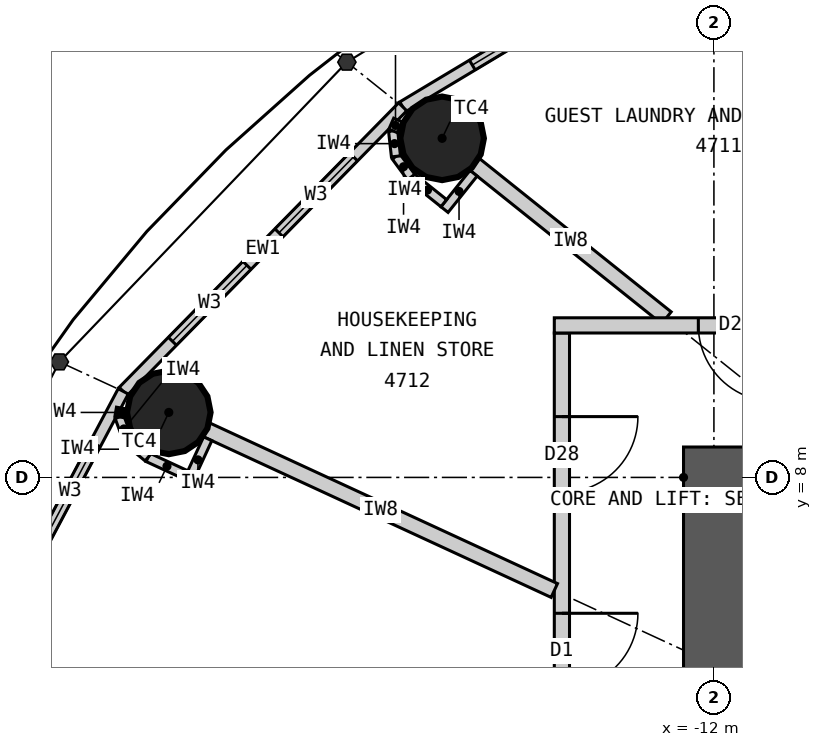
"""IFC4 building model, lengths in metres.
Left out: names, types, materials, properties, quantities, classifications, styles, units other than length and angle.
Written with IfcOpenShell. Run it as: python <this file> out.ifc"""

import sys

from ifc_helpers import new_model, si_unit, direction, frame, frame_2d, origin, origin_2d, place, context, subcontext, project, spatial, rectangle, circle, extrude, element, fill, save


model = new_model("IFC4")
c1 = context("Model", 3, precision=1e-05, world=origin(), true_north=direction((0.0, 1.0)))
c2 = subcontext(c1, "Body", "Model", "MODEL_VIEW")
j1 = project(units=[si_unit("LENGTHUNIT", "METRE"), si_unit("PLANEANGLEUNIT", "RADIAN")], contexts=[c1])
p1 = place(None, origin())
s1 = spatial("IfcSite", under=j1, at=p1, CompositionType="ELEMENT")
p2 = place(p1, origin())
s2 = spatial("IfcBuilding", under=s1, at=p2, CompositionType="ELEMENT")
p3 = place(p2, frame((0.0, 0.0, 176.4)))
s3 = spatial("IfcBuildingStorey", under=s2, at=p3, CompositionType="ELEMENT", Elevation=176.4)
for number, where, z_axis, x_axis in (
    (1, (-15.576, 12.461, 0.0), (0.0, 0.0, 1.0), (1.0, 0.0, 0.0)),
    (2, (-19.172, 8.855, 0.0), (0.0, 0.0, 1.0), (1.0, 0.0, 0.0)),
):
    element("IfcColumn", number, at=place(p3, frame(where, z_axis=z_axis, x_axis=x_axis)), inside=s3, PredefinedType="COLUMN", context=c2, shape_type="SweptSolid", body=[
        extrude(circle(Radius=0.55, at=origin_2d()), origin(), (0.0, 0.0, 1.0), 3.3),
    ])
p4 = place(p3, frame((-12.4, 8.0, 0.0), z_axis=(0.0, 0.0, 1.0), x_axis=(1.0, 0.0, 0.0)))
e3 = element("IfcWall", 3, at=p4, inside=s3, PredefinedType="SHEAR", context=c2, shape_type="SweptSolid", body=[
    extrude(rectangle(XDim=24.8, YDim=0.8, at=frame_2d((12.4, 0.0))), origin(), (0.0, 0.0, 1.0), 3.3),
])
p5 = place(p4, frame((11.1, 0.0, 0.0)))
e4 = element("IfcOpeningElement", 4, at=p5, cuts=e3, PredefinedType="OPENING", context=c2, shape_type="SweptSolid", body=[
    extrude(rectangle(XDim=1.2, YDim=2.2, at=frame_2d((0.6, 1.1))), frame((0.0, 0.41, 0.0), z_axis=(0.0, -1.0, 0.0), x_axis=(1.0, 0.0, 0.0)), (0.0, 0.0, 1.0), 0.82),
])
p6 = place(p4, frame((18.7, 0.0, 0.0)))
e5 = element("IfcOpeningElement", 5, at=p6, cuts=e3, PredefinedType="OPENING", context=c2, shape_type="SweptSolid", body=[
    extrude(rectangle(XDim=0.9, YDim=2.2, at=frame_2d((0.45, 1.1))), frame((0.0, 0.41, 0.0), z_axis=(0.0, -1.0, 0.0), x_axis=(1.0, 0.0, 0.0)), (0.0, 0.0, 1.0), 0.82),
])
p7 = place(p3, frame((-12.0, 7.6, 0.0), z_axis=(0.0, 0.0, 1.0), x_axis=(0.0, -1.0, 0.0)))
e6 = element("IfcWall", 6, at=p7, inside=s3, PredefinedType="SHEAR", context=c2, shape_type="SweptSolid", body=[
    extrude(rectangle(XDim=15.2, YDim=0.8, at=frame_2d((7.6, 0.0))), origin(), (0.0, 0.0, 1.0), 3.3),
])
p8 = place(p7, frame((6.7, 0.0, 0.0)))
e7 = element("IfcOpeningElement", 7, at=p8, cuts=e6, PredefinedType="OPENING", context=c2, shape_type="SweptSolid", body=[
    extrude(rectangle(XDim=1.8, YDim=2.2, at=frame_2d((0.9, 1.1))), frame((0.0, 0.41, 0.0), z_axis=(0.0, -1.0, 0.0), x_axis=(1.0, 0.0, 0.0)), (0.0, 0.0, 1.0), 0.82),
])
p9 = place(p3, frame((-11.346, 15.722, 0.0), z_axis=(0.0, 0.0, 1.0), x_axis=(-0.857695199231, -0.514158482587, 0.0)))
e8 = element("IfcWall", 8, at=p9, inside=s3, PredefinedType="ELEMENTEDWALL", context=c2, shape_type="SweptSolid", body=[
    extrude(rectangle(XDim=5.536, YDim=0.15, at=frame_2d((2.768, 0.0))), origin(), (0.0, 0.0, 1.0), 3.12),
])
p10 = place(p9, frame((1.068, 0.0, 0.9)))
e9 = element("IfcOpeningElement", 9, at=p10, cuts=e8, PredefinedType="OPENING", context=c2, shape_type="SweptSolid", body=[
    extrude(rectangle(XDim=1.4, YDim=1.9, at=frame_2d((0.7, 0.95))), frame((0.0, 0.085, 0.0), z_axis=(0.0, -1.0, 0.0), x_axis=(1.0, 0.0, 0.0)), (0.0, 0.0, 1.0), 0.17),
])
p11 = place(p9, frame((3.068, 0.0, 0.9)))
e10 = element("IfcOpeningElement", 10, at=p11, cuts=e8, PredefinedType="OPENING", context=c2, shape_type="SweptSolid", body=[
    extrude(rectangle(XDim=1.4, YDim=1.9, at=frame_2d((0.7, 0.95))), frame((0.0, 0.085, 0.0), z_axis=(0.0, -1.0, 0.0), x_axis=(1.0, 0.0, 0.0)), (0.0, 0.0, 1.0), 0.17),
])
p12 = place(p3, frame((-16.095, 12.876, 0.0), z_axis=(0.0, 0.0, 1.0), x_axis=(-0.700727467776, -0.71342905457, 0.0)))
e11 = element("IfcWall", 11, at=p12, inside=s3, PredefinedType="ELEMENTEDWALL", context=c2, shape_type="SweptSolid", body=[
    extrude(rectangle(XDim=5.247, YDim=0.15, at=frame_2d((2.624, 0.0))), origin(), (0.0, 0.0, 1.0), 3.12),
])
p13 = place(p12, frame((0.924, 0.0, 0.9)))
e12 = element("IfcOpeningElement", 12, at=p13, cuts=e11, PredefinedType="OPENING", context=c2, shape_type="SweptSolid", body=[
    extrude(rectangle(XDim=1.4, YDim=1.9, at=frame_2d((0.7, 0.95))), frame((0.0, 0.085, 0.0), z_axis=(0.0, -1.0, 0.0), x_axis=(1.0, 0.0, 0.0)), (0.0, 0.0, 1.0), 0.17),
])
p14 = place(p12, frame((2.924, 0.0, 0.9)))
e13 = element("IfcOpeningElement", 13, at=p14, cuts=e11, PredefinedType="OPENING", context=c2, shape_type="SweptSolid", body=[
    extrude(rectangle(XDim=1.4, YDim=1.9, at=frame_2d((0.7, 0.95))), frame((0.0, 0.085, 0.0), z_axis=(0.0, -1.0, 0.0), x_axis=(1.0, 0.0, 0.0)), (0.0, 0.0, 1.0), 0.17),
])
p15 = place(p3, frame((-19.772, 9.132, 0.0), z_axis=(0.0, 0.0, 1.0), x_axis=(-0.468428906714, -0.883501193748, 0.0)))
e14 = element("IfcWall", 14, at=p15, inside=s3, PredefinedType="ELEMENTEDWALL", context=c2, shape_type="SweptSolid", body=[
    extrude(rectangle(XDim=4.974, YDim=0.15, at=frame_2d((2.487, 0.0))), origin(), (0.0, 0.0, 1.0), 3.12),
])
p16 = place(p15, frame((0.787, 0.0, 0.9)))
e15 = element("IfcOpeningElement", 15, at=p16, cuts=e14, PredefinedType="OPENING", context=c2, shape_type="SweptSolid", body=[
    extrude(rectangle(XDim=1.4, YDim=1.9, at=frame_2d((0.7, 0.95))), frame((0.0, 0.085, 0.0), z_axis=(0.0, -1.0, 0.0), x_axis=(1.0, 0.0, 0.0)), (0.0, 0.0, 1.0), 0.17),
])
p17 = place(p15, frame((2.787, 0.0, 0.9)))
e16 = element("IfcOpeningElement", 16, at=p17, cuts=e14, PredefinedType="OPENING", context=c2, shape_type="SweptSolid", body=[
    extrude(rectangle(XDim=1.4, YDim=1.9, at=frame_2d((0.7, 0.95))), frame((0.0, 0.085, 0.0), z_axis=(0.0, -1.0, 0.0), x_axis=(1.0, 0.0, 0.0)), (0.0, 0.0, 1.0), 0.17),
])
p18 = place(p3, frame((-14.0, 9.9, 0.0), z_axis=(0.0, 0.0, 1.0), x_axis=(0.0, -1.0, 0.0)))
e17 = element("IfcWall", 17, at=p18, inside=s3, PredefinedType="PARTITIONING", context=c2, shape_type="SweptSolid", body=[
    extrude(rectangle(XDim=19.8, YDim=0.2, at=frame_2d((9.9, 0.0))), origin(), (0.0, 0.0, 1.0), 3.12),
])
p19 = place(p18, frame((13.853, 0.0, 0.0)))
e18 = element("IfcOpeningElement", 18, at=p19, cuts=e17, PredefinedType="OPENING", context=c2, shape_type="SweptSolid", body=[
    extrude(rectangle(XDim=1.0, YDim=2.2, at=frame_2d((0.5, 1.1))), frame((0.0, 0.11, 0.0), z_axis=(0.0, -1.0, 0.0), x_axis=(1.0, 0.0, 0.0)), (0.0, 0.0, 1.0), 0.22),
])
p20 = place(p18, frame((1.1, 0.0, 0.0)))
e19 = element("IfcOpeningElement", 19, at=p20, cuts=e17, PredefinedType="OPENING", context=c2, shape_type="SweptSolid", body=[
    extrude(rectangle(XDim=1.0, YDim=2.2, at=frame_2d((0.5, 1.1))), frame((0.0, 0.11, 0.0), z_axis=(0.0, -1.0, 0.0), x_axis=(1.0, 0.0, 0.0)), (0.0, 0.0, 1.0), 0.22),
])
p21 = place(p18, frame((3.688, 0.0, 0.0)))
e20 = element("IfcOpeningElement", 20, at=p21, cuts=e17, PredefinedType="OPENING", context=c2, shape_type="SweptSolid", body=[
    extrude(rectangle(XDim=1.0, YDim=2.2, at=frame_2d((0.5, 1.1))), frame((0.0, 0.11, 0.0), z_axis=(0.0, -1.0, 0.0), x_axis=(1.0, 0.0, 0.0)), (0.0, 0.0, 1.0), 0.22),
])
p22 = place(p18, frame((8.719, 0.0, 0.0)))
e21 = element("IfcOpeningElement", 21, at=p22, cuts=e17, PredefinedType="OPENING", context=c2, shape_type="SweptSolid", body=[
    extrude(rectangle(XDim=1.0, YDim=2.2, at=frame_2d((0.5, 1.1))), frame((0.0, 0.11, 0.0), z_axis=(0.0, -1.0, 0.0), x_axis=(1.0, 0.0, 0.0)), (0.0, 0.0, 1.0), 0.22),
])
p23 = place(p3, frame((-12.625, 10.1, 0.0), z_axis=(0.0, 0.0, 1.0), x_axis=(-0.780876185034, 0.624685827954, 0.0)))
e22 = element("IfcWall", 22, at=p23, inside=s3, PredefinedType="PARTITIONING", context=c2, shape_type="SweptSolid", body=[
    extrude(rectangle(XDim=3.229, YDim=0.2, at=frame_2d((1.615, 0.0))), origin(), (0.0, 0.0, 1.0), 2.42),
])
p24 = place(p3, frame((-14.1, 6.512, 0.0), z_axis=(0.0, 0.0, 1.0), x_axis=(-0.907823150669, 0.419353224751, 0.0)))
e23 = element("IfcWall", 23, at=p24, inside=s3, PredefinedType="PARTITIONING", context=c2, shape_type="SweptSolid", body=[
    extrude(rectangle(XDim=5.037, YDim=0.2, at=frame_2d((2.519, 0.0))), origin(), (0.0, 0.0, 1.0), 2.32),
])
p25 = place(p3, frame((-14.1, 10.0, 0.0), z_axis=(0.0, 0.0, 1.0), x_axis=(1.0, 0.0, 0.0)))
e24 = element("IfcWall", 24, at=p25, inside=s3, PredefinedType="PARTITIONING", context=c2, shape_type="SweptSolid", body=[
    extrude(rectangle(XDim=15.808, YDim=0.2, at=frame_2d((7.904, 0.0))), origin(), (0.0, 0.0, 1.0), 3.12),
])
p26 = place(p25, frame((11.135, 0.0, 0.0)))
e25 = element("IfcOpeningElement", 25, at=p26, cuts=e24, PredefinedType="OPENING", context=c2, shape_type="SweptSolid", body=[
    extrude(rectangle(XDim=1.0, YDim=2.2, at=frame_2d((0.5, 1.1))), frame((0.0, 0.11, 0.0), z_axis=(0.0, -1.0, 0.0), x_axis=(1.0, 0.0, 0.0)), (0.0, 0.0, 1.0), 0.22),
])
p27 = place(p25, frame((1.895, 0.0, 0.0)))
e26 = element("IfcOpeningElement", 26, at=p27, cuts=e24, PredefinedType="OPENING", context=c2, shape_type="SweptSolid", body=[
    extrude(rectangle(XDim=1.0, YDim=2.2, at=frame_2d((0.5, 1.1))), frame((0.0, 0.11, 0.0), z_axis=(0.0, -1.0, 0.0), x_axis=(1.0, 0.0, 0.0)), (0.0, 0.0, 1.0), 0.22),
])
p28 = place(p3, frame((-15.162, 12.002, 0.0), z_axis=(0.0, 0.0, 1.0), x_axis=(-0.624597762427, -0.780946627607, 0.0)))
e27 = element("IfcWall", 27, at=p28, inside=s3, PredefinedType="PARTITIONING", context=c2, shape_type="SweptSolid", body=[
    extrude(rectangle(XDim=0.612, YDim=0.12, at=frame_2d((0.306, 0.0))), origin(), (0.0, 0.0, 1.0), 3.12),
])
p29 = place(p3, frame((-15.554, 11.608, 0.0), z_axis=(0.0, 0.0, 1.0), x_axis=(-0.780695577787, 0.624911525597, 0.0)))
e28 = element("IfcWall", 28, at=p29, inside=s3, PredefinedType="PARTITIONING", context=c2, shape_type="SweptSolid", body=[
    extrude(rectangle(XDim=0.55, YDim=0.12, at=frame_2d((0.275, 0.0))), origin(), (0.0, 0.0, 1.0), 3.12),
])
p30 = place(p3, frame((-15.984, 11.952, 0.0), z_axis=(0.0, 0.0, 1.0), x_axis=(-0.592335221171, 0.805691619517, 0.0)))
e29 = element("IfcWall", 29, at=p30, inside=s3, PredefinedType="PARTITIONING", context=c2, shape_type="SweptSolid", body=[
    extrude(rectangle(XDim=0.338, YDim=0.12, at=frame_2d((0.169, 0.0))), origin(), (0.0, 0.0, 1.0), 3.12),
])
p31 = place(p3, frame((-16.184, 12.224, 0.0), z_axis=(0.0, 0.0, 1.0), x_axis=(-0.110669692975, 0.993857242795, 0.0)))
e30 = element("IfcWall", 30, at=p31, inside=s3, PredefinedType="PARTITIONING", context=c2, shape_type="SweptSolid", body=[
    extrude(rectangle(XDim=0.337, YDim=0.12, at=frame_2d((0.169, 0.0))), origin(), (0.0, 0.0, 1.0), 3.12),
])
p32 = place(p3, frame((-16.221, 12.559, 0.0), z_axis=(0.0, 0.0, 1.0), x_axis=(0.401064416249, 0.916049853457, 0.0)))
e31 = element("IfcWall", 31, at=p32, inside=s3, PredefinedType="PARTITIONING", context=c2, shape_type="SweptSolid", body=[
    extrude(rectangle(XDim=0.156, YDim=0.12, at=frame_2d((0.078, 0.0))), origin(), (0.0, 0.0, 1.0), 3.12),
])
p33 = place(p3, frame((-18.66, 8.509, 0.0), z_axis=(0.0, 0.0, 1.0), x_axis=(-0.419083463716, -0.907947713494, 0.0)))
e32 = element("IfcWall", 32, at=p33, inside=s3, PredefinedType="PARTITIONING", context=c2, shape_type="SweptSolid", body=[
    extrude(rectangle(XDim=0.612, YDim=0.12, at=frame_2d((0.306, 0.0))), origin(), (0.0, 0.0, 1.0), 3.12),
])
p34 = place(p3, frame((-18.946, 8.032, 0.0), z_axis=(0.0, 0.0, 1.0), x_axis=(-0.907842467956, 0.419311403822, 0.0)))
e33 = element("IfcWall", 33, at=p34, inside=s3, PredefinedType="PARTITIONING", context=c2, shape_type="SweptSolid", body=[
    extrude(rectangle(XDim=0.55, YDim=0.12, at=frame_2d((0.275, 0.0))), origin(), (0.0, 0.0, 1.0), 3.12),
])
p35 = place(p3, frame((-19.446, 8.263, 0.0), z_axis=(0.0, 0.0, 1.0), x_axis=(-0.768221279597, 0.640184399664, 0.0)))
e34 = element("IfcWall", 34, at=p35, inside=s3, PredefinedType="PARTITIONING", context=c2, shape_type="SweptSolid", body=[
    extrude(rectangle(XDim=0.337, YDim=0.12, at=frame_2d((0.169, 0.0))), origin(), (0.0, 0.0, 1.0), 3.12),
])
p36 = place(p3, frame((-19.705, 8.479, 0.0), z_axis=(0.0, 0.0, 1.0), x_axis=(-0.345571344575, 0.938392479621, 0.0)))
e35 = element("IfcWall", 35, at=p36, inside=s3, PredefinedType="PARTITIONING", context=c2, shape_type="SweptSolid", body=[
    extrude(rectangle(XDim=0.338, YDim=0.12, at=frame_2d((0.169, 0.0))), origin(), (0.0, 0.0, 1.0), 3.12),
])
p37 = place(p3, frame((-19.822, 8.796, 0.0), z_axis=(0.0, 0.0, 1.0), x_axis=(0.169701508781, 0.985495508827, 0.0)))
e36 = element("IfcWall", 36, at=p37, inside=s3, PredefinedType="PARTITIONING", context=c2, shape_type="SweptSolid", body=[
    extrude(rectangle(XDim=0.119, YDim=0.12, at=frame_2d((0.06, 0.0))), origin(), (0.0, 0.0, 1.0), 3.12),
])
p38 = place(p11, origin())
e37 = element("IfcWindow", 37, at=p38, inside=s3, PartitioningType="SINGLE_PANEL", PredefinedType="WINDOW", context=c2, shape_type="SweptSolid", body=[
    extrude(rectangle(XDim=1.4, YDim=1.9, at=frame_2d((0.7, 0.95))), frame((0.0, 0.03, 0.0), z_axis=(0.0, -1.0, 0.0), x_axis=(1.0, 0.0, 0.0)), (0.0, 0.0, 1.0), 0.06),
])
fill(e10, e37)
p39 = place(p13, origin())
e38 = element("IfcWindow", 38, at=p39, inside=s3, PartitioningType="SINGLE_PANEL", PredefinedType="WINDOW", context=c2, shape_type="SweptSolid", body=[
    extrude(rectangle(XDim=1.4, YDim=1.9, at=frame_2d((0.7, 0.95))), frame((0.0, 0.03, 0.0), z_axis=(0.0, -1.0, 0.0), x_axis=(1.0, 0.0, 0.0)), (0.0, 0.0, 1.0), 0.06),
])
fill(e12, e38)
p40 = place(p14, origin())
e39 = element("IfcWindow", 39, at=p40, inside=s3, PartitioningType="SINGLE_PANEL", PredefinedType="WINDOW", context=c2, shape_type="SweptSolid", body=[
    extrude(rectangle(XDim=1.4, YDim=1.9, at=frame_2d((0.7, 0.95))), frame((0.0, 0.03, 0.0), z_axis=(0.0, -1.0, 0.0), x_axis=(1.0, 0.0, 0.0)), (0.0, 0.0, 1.0), 0.06),
])
fill(e13, e39)
p41 = place(p16, origin())
e40 = element("IfcWindow", 40, at=p41, inside=s3, PartitioningType="SINGLE_PANEL", PredefinedType="WINDOW", context=c2, shape_type="SweptSolid", body=[
    extrude(rectangle(XDim=1.4, YDim=1.9, at=frame_2d((0.7, 0.95))), frame((0.0, 0.03, 0.0), z_axis=(0.0, -1.0, 0.0), x_axis=(1.0, 0.0, 0.0)), (0.0, 0.0, 1.0), 0.06),
])
fill(e15, e40)
p42 = place(p27, origin())
e41 = element("IfcDoor", 41, at=p42, inside=s3, OperationType="SINGLE_SWING_RIGHT", PredefinedType="DOOR", context=c2, shape_type="SweptSolid", body=[
    extrude(rectangle(XDim=1.0, YDim=2.2, at=frame_2d((0.5, 1.1))), frame((0.0, 0.025, 0.0), z_axis=(0.0, -1.0, 0.0), x_axis=(1.0, 0.0, 0.0)), (0.0, 0.0, 1.0), 0.05),
])
fill(e26, e41)
p43 = place(p20, origin())
e42 = element("IfcDoor", 42, at=p43, inside=s3, OperationType="SINGLE_SWING_LEFT", PredefinedType="DOOR", context=c2, shape_type="SweptSolid", body=[
    extrude(rectangle(XDim=1.0, YDim=2.2, at=frame_2d((0.5, 1.1))), frame((0.0, 0.025, 0.0), z_axis=(0.0, -1.0, 0.0), x_axis=(1.0, 0.0, 0.0)), (0.0, 0.0, 1.0), 0.05),
])
fill(e19, e42)
p44 = place(p21, origin())
e43 = element("IfcDoor", 43, at=p44, inside=s3, OperationType="SINGLE_SWING_LEFT", PredefinedType="DOOR", context=c2, shape_type="SweptSolid", body=[
    extrude(rectangle(XDim=1.0, YDim=2.2, at=frame_2d((0.5, 1.1))), frame((0.0, 0.025, 0.0), z_axis=(0.0, -1.0, 0.0), x_axis=(1.0, 0.0, 0.0)), (0.0, 0.0, 1.0), 0.05),
])
fill(e20, e43)
save(model, sys.argv[1])
